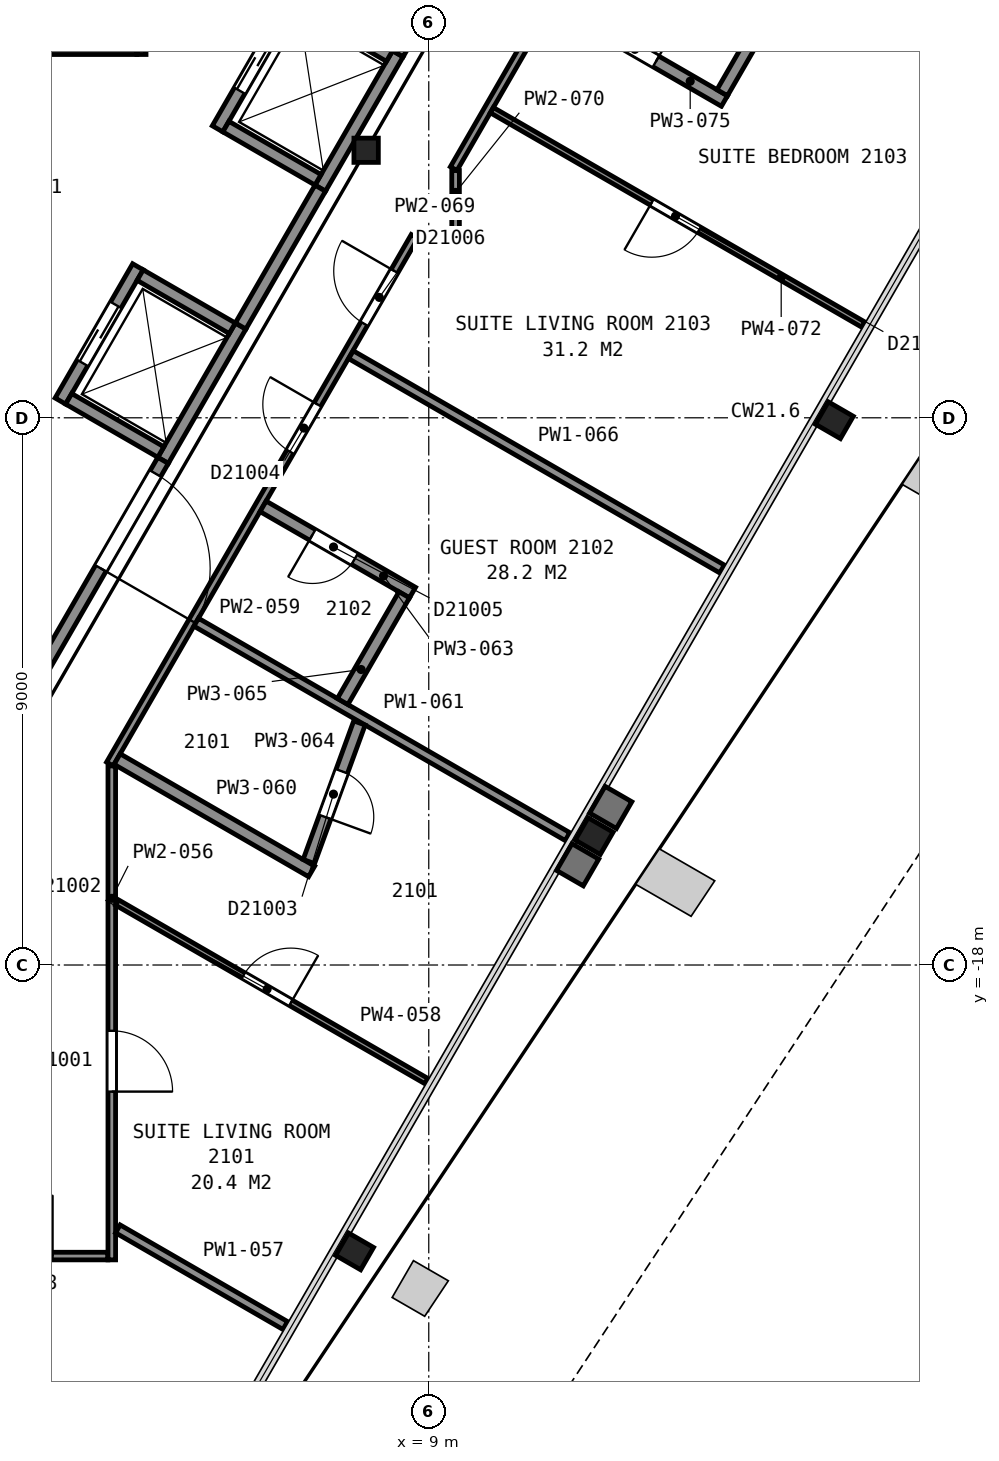
"""IFC4 building model, lengths in metres.
Left out: names, types, materials, properties, quantities, classifications, styles, units other than length and angle.
Written with IfcOpenShell. Run it as: python <this file> out.ifc"""

import sys

from ifc_helpers import new_model, si_unit, direction, frame, frame_2d, origin, origin_2d, place, context, subcontext, project, spatial, rectangle, i_section, extrude, element, fill, save


model = new_model("IFC4")
c1 = context("Model", 3, precision=1e-05, world=origin(), true_north=direction((0.0, 1.0)))
c2 = subcontext(c1, "Body", "Model", "MODEL_VIEW")
j1 = project(units=[si_unit("LENGTHUNIT", "METRE"), si_unit("PLANEANGLEUNIT", "RADIAN")], contexts=[c1])
p1 = place(None, origin())
s1 = spatial("IfcSite", under=j1, at=p1, CompositionType="ELEMENT")
p2 = place(p1, origin())
s2 = spatial("IfcBuilding", under=s1, at=p2, CompositionType="ELEMENT")
p3 = place(p2, frame((0.0, 0.0, 92.8)))
s3 = spatial("IfcBuildingStorey", under=s2, at=p3, CompositionType="ELEMENT", Elevation=92.8)
for number, where, z_axis, x_axis in (
    (1, (7.78, -22.71, 0.0), (0.0, 0.0, 1.0), (-0.5, -0.866, 0.0)),
    (2, (11.72, -15.88, 0.0), (0.0, 0.0, 1.0), (-0.5, -0.866, 0.0)),
    (3, (15.67, -9.04, 0.0), (0.0, 0.0, 1.0), (-0.5, -0.866, 0.0)),
):
    element("IfcColumn", number, at=place(p3, frame(where, z_axis=z_axis, x_axis=x_axis)), inside=s3, PredefinedType="COLUMN", context=c2, shape_type="SweptSolid", body=[
        extrude(i_section(OverallWidth=0.424, OverallDepth=0.475, WebThickness=0.048, FlangeThickness=0.077, FilletRadius=0.015, at=origin_2d()), origin(), (0.0, 0.0, 1.0), 3.6),
    ])
p4 = place(p3, frame((7.97, -4.6, 0.0), z_axis=(0.0, 0.0, 1.0), x_axis=(1.0, 0.0, 0.0)))
e4 = element("IfcColumn", 4, at=p4, inside=s3, PredefinedType="COLUMN", context=c2, shape_type="SweptSolid", body=[
    extrude(i_section(OverallWidth=0.401, OverallDepth=0.399, WebThickness=0.025, FlangeThickness=0.04, FilletRadius=0.015, at=origin_2d()), origin(), (0.0, 0.0, 1.0), 3.6),
])
p5 = place(p3, frame((4.63, -9.7, 0.0), z_axis=(0.0, 0.0, 1.0), x_axis=(0.500062241894, 0.865989465428, 0.0)))
e5 = element("IfcWall", 5, at=p5, inside=s3, PredefinedType="PARTITIONING", context=c2, shape_type="SweptSolid", body=[
    extrude(rectangle(XDim=2.55, YDim=0.2, at=frame_2d((1.275, 0.0))), origin(), (0.0, 0.0, 1.0), 3.6),
])
p6 = place(p3, frame((7.216, -5.222, 0.0), z_axis=(0.0, 0.0, 1.0), x_axis=(0.499990435942, 0.866030925526, 0.0)))
e6 = element("IfcWall", 6, at=p6, inside=s3, PredefinedType="PARTITIONING", context=c2, shape_type="SweptSolid", body=[
    extrude(rectangle(XDim=2.55, YDim=0.2, at=frame_2d((1.275, 0.0))), origin(), (0.0, 0.0, 1.0), 3.6),
])
p7 = place(p3, frame((2.942, -8.725, 0.0), z_axis=(0.0, 0.0, 1.0), x_axis=(0.500020783669, 0.866013403995, 0.0)))
e7 = element("IfcWall", 7, at=p7, inside=s3, PredefinedType="PARTITIONING", context=c2, shape_type="SweptSolid", body=[
    extrude(rectangle(XDim=2.55, YDim=0.2, at=frame_2d((1.275, 0.0))), origin(), (0.0, 0.0, 1.0), 3.6),
])
p8 = place(p7, frame((0.725, 0.0, 0.0)))
e8 = element("IfcOpeningElement", 8, at=p8, cuts=e7, PredefinedType="OPENING", context=c2, shape_type="SweptSolid", body=[
    extrude(rectangle(XDim=1.1, YDim=2.1, at=frame_2d((0.55, 1.05))), frame((0.0, 0.11, 0.0), z_axis=(0.0, -1.0, 0.0), x_axis=(1.0, 0.0, 0.0)), (0.0, 0.0, 1.0), 0.22),
])
p9 = place(p3, frame((5.527, -4.247, 0.0), z_axis=(0.0, 0.0, 1.0), x_axis=(0.499938297808, 0.866061024631, 0.0)))
e9 = element("IfcWall", 9, at=p9, inside=s3, PredefinedType="PARTITIONING", context=c2, shape_type="SweptSolid", body=[
    extrude(rectangle(XDim=2.35, YDim=0.2, at=frame_2d((1.175, 0.0))), origin(), (0.0, 0.0, 1.0), 3.6),
])
p10 = place(p9, frame((0.725, 0.0, 0.0)))
e10 = element("IfcOpeningElement", 10, at=p10, cuts=e9, PredefinedType="OPENING", context=c2, shape_type="SweptSolid", body=[
    extrude(rectangle(XDim=1.1, YDim=2.1, at=frame_2d((0.55, 1.05))), frame((0.0, 0.11, 0.0), z_axis=(0.0, -1.0, 0.0), x_axis=(1.0, 0.0, 0.0)), (0.0, 0.0, 1.0), 0.22),
])
p11 = place(p3, frame((8.354, -3.051, 0.0), z_axis=(0.0, 0.0, 1.0), x_axis=(-0.866060182126, 0.499939757307, 0.0)))
e11 = element("IfcWall", 11, at=p11, inside=s3, PredefinedType="PARTITIONING", context=c2, shape_type="SweptSolid", body=[
    extrude(rectangle(XDim=2.95, YDim=0.2, at=frame_2d((1.475, 0.0))), origin(), (0.0, 0.0, 1.0), 3.6),
])
p12 = place(p3, frame((7.179, -5.086, 0.0), z_axis=(0.0, 0.0, 1.0), x_axis=(-0.866036909293, 0.499980071345, 0.0)))
e12 = element("IfcWall", 12, at=p12, inside=s3, PredefinedType="PARTITIONING", context=c2, shape_type="SweptSolid", body=[
    extrude(rectangle(XDim=1.75, YDim=0.2, at=frame_2d((0.875, 0.0))), origin(), (0.0, 0.0, 1.0), 3.6),
])
p13 = place(p3, frame((5.769, -7.528, 0.0), z_axis=(0.0, 0.0, 1.0), x_axis=(-0.866002029911, 0.500040482552, 0.0)))
e13 = element("IfcWall", 13, at=p13, inside=s3, PredefinedType="PARTITIONING", context=c2, shape_type="SweptSolid", body=[
    extrude(rectangle(XDim=1.75, YDim=0.2, at=frame_2d((0.875, 0.0))), origin(), (0.0, 0.0, 1.0), 3.6),
])
p14 = place(p3, frame((4.594, -9.563, 0.0), z_axis=(0.0, 0.0, 1.0), x_axis=(-0.866036909293, 0.499980071345, 0.0)))
e14 = element("IfcWall", 14, at=p14, inside=s3, PredefinedType="PARTITIONING", context=c2, shape_type="SweptSolid", body=[
    extrude(rectangle(XDim=1.75, YDim=0.2, at=frame_2d((0.875, 0.0))), origin(), (0.0, 0.0, 1.0), 3.6),
])
p15 = place(p3, frame((1.677, -14.815, 0.0), z_axis=(0.0, 0.0, 1.0), x_axis=(0.49999445743, 0.866028603765, 0.0)))
e15 = element("IfcWall", 15, at=p15, inside=s3, PredefinedType="PARTITIONING", context=c2, shape_type="SweptSolid", body=[
    extrude(rectangle(XDim=5.905, YDim=0.2, at=frame_2d((2.952, 0.0))), origin(), (0.0, 0.0, 1.0), 3.35),
])
p16 = place(p15, frame((3.855, 0.0, 0.0)))
e16 = element("IfcOpeningElement", 16, at=p16, cuts=e15, PredefinedType="OPENING", context=c2, shape_type="SweptSolid", body=[
    extrude(rectangle(XDim=1.8, YDim=2.1, at=frame_2d((0.9, 1.05))), frame((0.0, 0.11, 0.0), z_axis=(0.0, -1.0, 0.0), x_axis=(1.0, 0.0, 0.0)), (0.0, 0.0, 1.0), 0.22),
])
p17 = place(p3, frame((1.8, -2.95, 0.0), z_axis=(0.0, 0.0, 1.0), x_axis=(1.0, 0.0, 0.0)))
e17 = element("IfcWall", 17, at=p17, inside=s3, PredefinedType="PARTITIONING", context=c2, shape_type="SweptSolid", body=[
    extrude(rectangle(XDim=2.4, YDim=0.15, at=frame_2d((1.2, 0.0))), origin(), (0.0, 0.0, 1.0), 3.35),
])
p18 = place(p3, frame((4.275, -3.025, 0.0), z_axis=(0.0, 0.0, 1.0), x_axis=(0.0, 1.0, 0.0)))
e18 = element("IfcWall", 18, at=p18, inside=s3, PredefinedType="PARTITIONING", context=c2, shape_type="SweptSolid", body=[
    extrude(rectangle(XDim=2.923, YDim=0.15, at=frame_2d((1.461, 0.0))), origin(), (0.0, 0.0, 1.0), 3.35),
])
p19 = place(p3, frame((5.906, -7.49, 0.0), z_axis=(0.0, 0.0, 1.0), x_axis=(0.500252727967, 0.865879442048, 0.0)))
e19 = element("IfcWall", 19, at=p19, inside=s3, PredefinedType="PARTITIONING", context=c2, shape_type="SweptSolid", body=[
    extrude(rectangle(XDim=2.617, YDim=0.2, at=frame_2d((1.309, 0.0))), origin(), (0.0, 0.0, 1.0), 3.35),
])
p20 = place(p3, frame((8.492, -3.012, 0.0), z_axis=(0.0, 0.0, 1.0), x_axis=(0.499972957231, 0.866041016371, 0.0)))
e20 = element("IfcWall", 20, at=p20, inside=s3, PredefinedType="PARTITIONING", context=c2, shape_type="SweptSolid", body=[
    extrude(rectangle(XDim=10.349, YDim=0.2, at=frame_2d((5.174, 0.0))), origin(), (0.0, 0.0, 1.0), 3.35),
])
p21 = place(p3, frame((3.722, -22.787, 0.0), z_axis=(0.0, 0.0, 1.0), x_axis=(-1.0, 0.0, 0.0)))
e21 = element("IfcWall", 21, at=p21, inside=s3, PredefinedType="PARTITIONING", context=c2, shape_type="SweptSolid", body=[
    extrude(rectangle(XDim=2.971, YDim=0.125, at=frame_2d((1.486, 0.0))), origin(), (0.0, 0.0, 1.0), 2.613),
])
p22 = place(p21, frame((0.909, 0.0, 0.0)))
e22 = element("IfcOpeningElement", 22, at=p22, cuts=e21, PredefinedType="OPENING", context=c2, shape_type="SweptSolid", body=[
    extrude(rectangle(XDim=1.0, YDim=2.1, at=frame_2d((0.5, 1.05))), frame((0.0, 0.073, 0.0), z_axis=(0.0, -1.0, 0.0), x_axis=(1.0, 0.0, 0.0)), (0.0, 0.0, 1.0), 0.145),
])
p23 = place(p3, frame((3.787, -14.725, 0.0), z_axis=(0.0, 0.0, 1.0), x_axis=(0.0, -1.0, 0.0)))
e23 = element("IfcWall", 23, at=p23, inside=s3, PredefinedType="PARTITIONING", context=c2, shape_type="SweptSolid", body=[
    extrude(rectangle(XDim=8.125, YDim=0.125, at=frame_2d((4.062, 0.0))), origin(), (0.0, 0.0, 1.0), 2.613),
])
p24 = place(p23, frame((4.357, 0.0, 0.0)))
e24 = element("IfcOpeningElement", 24, at=p24, cuts=e23, PredefinedType="OPENING", context=c2, shape_type="SweptSolid", body=[
    extrude(rectangle(XDim=1.0, YDim=2.1, at=frame_2d((0.5, 1.05))), frame((0.0, 0.073, 0.0), z_axis=(0.0, -1.0, 0.0), x_axis=(1.0, 0.0, 0.0)), (0.0, 0.0, 1.0), 0.145),
])
p25 = place(p3, frame((3.887, -22.34, 0.0), z_axis=(0.0, 0.0, 1.0), x_axis=(0.866065365018, -0.499930778725, 0.0)))
e25 = element("IfcWall", 25, at=p25, inside=s3, PredefinedType="PARTITIONING", context=c2, shape_type="SweptSolid", body=[
    extrude(rectangle(XDim=3.179, YDim=0.15, at=frame_2d((1.589, 0.0))), origin(), (0.0, 0.0, 1.0), 2.613),
])
p26 = place(p3, frame((3.875, -16.972, 0.0), z_axis=(0.0, 0.0, 1.0), x_axis=(0.86602429061, -0.500001928069, 0.0)))
e26 = element("IfcWall", 26, at=p26, inside=s3, PredefinedType="PARTITIONING", context=c2, shape_type="SweptSolid", body=[
    extrude(rectangle(XDim=5.873, YDim=0.1, at=frame_2d((2.937, 0.0))), origin(), (0.0, 0.0, 1.0), 2.613),
])
p27 = place(p26, frame((2.399, 0.0, 0.0)))
e27 = element("IfcOpeningElement", 27, at=p27, cuts=e26, PredefinedType="OPENING", context=c2, shape_type="SweptSolid", body=[
    extrude(rectangle(XDim=0.9, YDim=2.1, at=frame_2d((0.45, 1.05))), frame((0.0, 0.06, 0.0), z_axis=(0.0, -1.0, 0.0), x_axis=(1.0, 0.0, 0.0)), (0.0, 0.0, 1.0), 0.12),
])
p28 = place(p3, frame((8.766, -6.017, 0.0), z_axis=(0.0, 0.0, 1.0), x_axis=(-0.500051472265, -0.865995684219, 0.0)))
e28 = element("IfcWall", 28, at=p28, inside=s3, PredefinedType="PARTITIONING", context=c2, shape_type="SweptSolid", body=[
    extrude(rectangle(XDim=10.02, YDim=0.125, at=frame_2d((5.01, 0.0))), origin(), (0.0, 0.0, 1.0), 2.613),
])
p29 = place(p28, frame((3.19, 0.0, 0.0)))
e29 = element("IfcOpeningElement", 29, at=p29, cuts=e28, PredefinedType="OPENING", context=c2, shape_type="SweptSolid", body=[
    extrude(rectangle(XDim=0.9, YDim=2.1, at=frame_2d((0.45, 1.05))), frame((0.0, 0.073, 0.0), z_axis=(0.0, -1.0, 0.0), x_axis=(1.0, 0.0, 0.0)), (0.0, 0.0, 1.0), 0.145),
])
p30 = place(p28, frame((0.658, 0.0, 0.0)))
e30 = element("IfcOpeningElement", 30, at=p30, cuts=e28, PredefinedType="OPENING", context=c2, shape_type="SweptSolid", body=[
    extrude(rectangle(XDim=1.0, YDim=2.1, at=frame_2d((0.5, 1.05))), frame((0.0, 0.073, 0.0), z_axis=(0.0, -1.0, 0.0), x_axis=(1.0, 0.0, 0.0)), (0.0, 0.0, 1.0), 0.145),
])
p31 = place(p3, frame((3.875, -14.613, 0.0), z_axis=(0.0, 0.0, 1.0), x_axis=(0.865890522866, -0.500233547866, 0.0)))
e31 = element("IfcWall", 31, at=p31, inside=s3, PredefinedType="PARTITIONING", context=c2, shape_type="SweptSolid", body=[
    extrude(rectangle(XDim=3.694, YDim=0.2, at=frame_2d((1.847, 0.0))), origin(), (0.0, 0.0, 1.0), 2.613),
])
p32 = place(p3, frame((5.175, -12.362, 0.0), z_axis=(0.0, 0.0, 1.0), x_axis=(0.866031654768, -0.499989172823, 0.0)))
e32 = element("IfcWall", 32, at=p32, inside=s3, PredefinedType="PARTITIONING", context=c2, shape_type="SweptSolid", body=[
    extrude(rectangle(XDim=7.052, YDim=0.15, at=frame_2d((3.526, 0.0))), origin(), (0.0, 0.0, 1.0), 2.613),
])
p33 = place(p3, frame((8.733, -11.875, 0.0), z_axis=(0.0, 0.0, 1.0), x_axis=(-0.866048046904, 0.499960778915, 0.0)))
e33 = element("IfcWall", 33, at=p33, inside=s3, PredefinedType="PARTITIONING", context=c2, shape_type="SweptSolid", body=[
    extrude(rectangle(XDim=2.838, YDim=0.2, at=frame_2d((1.419, 0.0))), origin(), (0.0, 0.0, 1.0), 2.613),
])
p34 = place(p33, frame((1.1, 0.0, 0.0)))
e34 = element("IfcOpeningElement", 34, at=p34, cuts=e33, PredefinedType="OPENING", context=c2, shape_type="SweptSolid", body=[
    extrude(rectangle(XDim=0.8, YDim=2.1, at=frame_2d((0.4, 1.05))), frame((0.0, 0.11, 0.0), z_axis=(0.0, -1.0, 0.0), x_axis=(1.0, 0.0, 0.0)), (0.0, 0.0, 1.0), 0.22),
])
p35 = place(p3, frame((7.028, -16.298, 0.0), z_axis=(0.0, 0.0, 1.0), x_axis=(0.342817359533, 0.939402074728, 0.0)))
e35 = element("IfcWall", 35, at=p35, inside=s3, PredefinedType="PARTITIONING", context=c2, shape_type="SweptSolid", body=[
    extrude(rectangle(XDim=2.426, YDim=0.2, at=frame_2d((1.213, 0.0))), origin(), (0.0, 0.0, 1.0), 2.613),
])
p36 = place(p35, frame((0.78, 0.0, 0.0)))
e36 = element("IfcOpeningElement", 36, at=p36, cuts=e35, PredefinedType="OPENING", context=c2, shape_type="SweptSolid", body=[
    extrude(rectangle(XDim=0.8, YDim=2.1, at=frame_2d((0.4, 1.05))), frame((0.0, 0.11, 0.0), z_axis=(0.0, -1.0, 0.0), x_axis=(1.0, 0.0, 0.0)), (0.0, 0.0, 1.0), 0.22),
])
p37 = place(p3, frame((7.583, -13.666, 0.0), z_axis=(0.0, 0.0, 1.0), x_axis=(0.49983374806, 0.866121368112, 0.0)))
e37 = element("IfcWall", 37, at=p37, inside=s3, PredefinedType="PARTITIONING", context=c2, shape_type="SweptSolid", body=[
    extrude(rectangle(XDim=2.026, YDim=0.2, at=frame_2d((1.013, 0.0))), origin(), (0.0, 0.0, 1.0), 2.613),
])
p38 = place(p3, frame((7.72, -7.963, 0.0), z_axis=(0.0, 0.0, 1.0), x_axis=(0.865980767462, -0.500077304409, 0.0)))
e38 = element("IfcWall", 38, at=p38, inside=s3, PredefinedType="PARTITIONING", context=c2, shape_type="SweptSolid", body=[
    extrude(rectangle(XDim=7.047, YDim=0.15, at=frame_2d((3.524, 0.0))), origin(), (0.0, 0.0, 1.0), 2.613),
])
p39 = place(p3, frame((8.82, -6.071, 0.0), z_axis=(0.0, 0.0, 1.0), x_axis=(1.0, 0.0, 0.0)))
e39 = element("IfcWall", 39, at=p39, inside=s3, PredefinedType="PARTITIONING", context=c2, shape_type="SweptSolid", body=[
    extrude(rectangle(XDim=0.556, YDim=0.125, at=frame_2d((0.278, 0.0))), origin(), (0.0, 0.0, 1.0), 2.613),
])
p40 = place(p3, frame((9.441, -6.134, 0.0), z_axis=(0.0, 0.0, 1.0), x_axis=(0.0, 1.0, 0.0)))
e40 = element("IfcWall", 40, at=p40, inside=s3, PredefinedType="PARTITIONING", context=c2, shape_type="SweptSolid", body=[
    extrude(rectangle(XDim=1.2, YDim=0.125, at=frame_2d((0.6, 0.0))), origin(), (0.0, 0.0, 1.0), 2.613),
])
p41 = place(p3, frame((9.41, -4.902, 0.0), z_axis=(0.0, 0.0, 1.0), x_axis=(0.499971244726, 0.866042005013, 0.0)))
e41 = element("IfcWall", 41, at=p41, inside=s3, PredefinedType="PARTITIONING", context=c2, shape_type="SweptSolid", body=[
    extrude(rectangle(XDim=10.052, YDim=0.125, at=frame_2d((5.026, 0.0))), origin(), (0.0, 0.0, 1.0), 2.613),
])
p42 = place(p3, frame((10.037, -3.94, 0.0), z_axis=(0.0, 0.0, 1.0), x_axis=(0.866063951978, -0.499933226626, 0.0)))
e42 = element("IfcWall", 42, at=p42, inside=s3, PredefinedType="PARTITIONING", context=c2, shape_type="SweptSolid", body=[
    extrude(rectangle(XDim=7.052, YDim=0.1, at=frame_2d((3.526, 0.0))), origin(), (0.0, 0.0, 1.0), 2.613),
])
p43 = place(p42, frame((3.038, 0.0, 0.0)))
e43 = element("IfcOpeningElement", 43, at=p43, cuts=e42, PredefinedType="OPENING", context=c2, shape_type="SweptSolid", body=[
    extrude(rectangle(XDim=0.9, YDim=2.1, at=frame_2d((0.45, 1.05))), frame((0.0, 0.06, 0.0), z_axis=(0.0, -1.0, 0.0), x_axis=(1.0, 0.0, 0.0)), (0.0, 0.0, 1.0), 0.12),
])
p44 = place(p3, frame((11.062, -2.174, 0.0), z_axis=(0.0, 0.0, 1.0), x_axis=(0.866078705744, -0.499907666931, 0.0)))
e44 = element("IfcWall", 44, at=p44, inside=s3, PredefinedType="PARTITIONING", context=c2, shape_type="SweptSolid", body=[
    extrude(rectangle(XDim=3.233, YDim=0.2, at=frame_2d((1.616, 0.0))), origin(), (0.0, 0.0, 1.0), 2.613),
])
p45 = place(p44, frame((1.133, 0.0, 0.0)))
e45 = element("IfcOpeningElement", 45, at=p45, cuts=e44, PredefinedType="OPENING", context=c2, shape_type="SweptSolid", body=[
    extrude(rectangle(XDim=0.8, YDim=2.1, at=frame_2d((0.4, 1.05))), frame((0.0, 0.11, 0.0), z_axis=(0.0, -1.0, 0.0), x_axis=(1.0, 0.0, 0.0)), (0.0, 0.0, 1.0), 0.22),
])
p46 = place(p3, frame((12.363, 0.078, 0.0), z_axis=(0.0, 0.0, 1.0), x_axis=(0.86605175433, -0.499954356739, 0.0)))
e46 = element("IfcWall", 46, at=p46, inside=s3, PredefinedType="PARTITIONING", context=c2, shape_type="SweptSolid", body=[
    extrude(rectangle(XDim=7.048, YDim=0.15, at=frame_2d((3.524, 0.0))), origin(), (0.0, 0.0, 1.0), 2.613),
])
p47 = place(p3, frame((13.826, -3.653, 0.0), z_axis=(0.0, 0.0, 1.0), x_axis=(0.499719542643, 0.866187265377, 0.0)))
e47 = element("IfcWall", 47, at=p47, inside=s3, PredefinedType="PARTITIONING", context=c2, shape_type="SweptSolid", body=[
    extrude(rectangle(XDim=2.42, YDim=0.2, at=frame_2d((1.21, 0.0))), origin(), (0.0, 0.0, 1.0), 2.613),
])
p48 = place(p8, origin())
e48 = element("IfcDoor", 48, at=p48, inside=s3, OperationType="SLIDING_TO_RIGHT", PredefinedType="DOOR", context=c2, shape_type="SweptSolid", body=[
    extrude(rectangle(XDim=1.1, YDim=2.1, at=frame_2d((0.55, 1.05))), frame((0.0, 0.025, 0.0), z_axis=(0.0, -1.0, 0.0), x_axis=(1.0, 0.0, 0.0)), (0.0, 0.0, 1.0), 0.05),
])
fill(e8, e48)
p49 = place(p10, origin())
e49 = element("IfcDoor", 49, at=p49, inside=s3, OperationType="SLIDING_TO_LEFT", PredefinedType="DOOR", context=c2, shape_type="SweptSolid", body=[
    extrude(rectangle(XDim=1.1, YDim=2.1, at=frame_2d((0.55, 1.05))), frame((0.0, 0.025, 0.0), z_axis=(0.0, -1.0, 0.0), x_axis=(1.0, 0.0, 0.0)), (0.0, 0.0, 1.0), 0.05),
])
fill(e10, e49)
p50 = place(p16, origin())
e50 = element("IfcDoor", 50, at=p50, inside=s3, OperationType="DOUBLE_DOOR_SINGLE_SWING", PredefinedType="DOOR", context=c2, shape_type="SweptSolid", body=[
    extrude(rectangle(XDim=1.8, YDim=2.1, at=frame_2d((0.9, 1.05))), frame((0.0, 0.025, 0.0), z_axis=(0.0, -1.0, 0.0), x_axis=(1.0, 0.0, 0.0)), (0.0, 0.0, 1.0), 0.05),
])
fill(e16, e50)
p51 = place(p22, origin())
e51 = element("IfcDoor", 51, at=p51, inside=s3, OperationType="SINGLE_SWING_LEFT", PredefinedType="DOOR", context=c2, shape_type="SweptSolid", body=[
    extrude(rectangle(XDim=1.0, YDim=2.1, at=frame_2d((0.5, 1.05))), frame((0.0, 0.025, 0.0), z_axis=(0.0, -1.0, 0.0), x_axis=(1.0, 0.0, 0.0)), (0.0, 0.0, 1.0), 0.05),
])
fill(e22, e51)
p52 = place(p24, origin())
e52 = element("IfcDoor", 52, at=p52, inside=s3, OperationType="SINGLE_SWING_RIGHT", PredefinedType="DOOR", context=c2, shape_type="SweptSolid", body=[
    extrude(rectangle(XDim=1.0, YDim=2.1, at=frame_2d((0.5, 1.05))), frame((0.0, 0.025, 0.0), z_axis=(0.0, -1.0, 0.0), x_axis=(1.0, 0.0, 0.0)), (0.0, 0.0, 1.0), 0.05),
])
fill(e24, e52)
p53 = place(p27, origin())
e53 = element("IfcDoor", 53, at=p53, inside=s3, OperationType="SINGLE_SWING_RIGHT", PredefinedType="DOOR", context=c2, shape_type="SweptSolid", body=[
    extrude(rectangle(XDim=0.9, YDim=2.1, at=frame_2d((0.45, 1.05))), frame((0.0, 0.025, 0.0), z_axis=(0.0, -1.0, 0.0), x_axis=(1.0, 0.0, 0.0)), (0.0, 0.0, 1.0), 0.05),
])
fill(e27, e53)
p54 = place(p29, origin())
e54 = element("IfcDoor", 54, at=p54, inside=s3, OperationType="SINGLE_SWING_LEFT", PredefinedType="DOOR", context=c2, shape_type="SweptSolid", body=[
    extrude(rectangle(XDim=0.9, YDim=2.1, at=frame_2d((0.45, 1.05))), frame((0.0, 0.025, 0.0), z_axis=(0.0, -1.0, 0.0), x_axis=(1.0, 0.0, 0.0)), (0.0, 0.0, 1.0), 0.05),
])
fill(e29, e54)
p55 = place(p30, origin())
e55 = element("IfcDoor", 55, at=p55, inside=s3, OperationType="SINGLE_SWING_LEFT", PredefinedType="DOOR", context=c2, shape_type="SweptSolid", body=[
    extrude(rectangle(XDim=1.0, YDim=2.1, at=frame_2d((0.5, 1.05))), frame((0.0, 0.025, 0.0), z_axis=(0.0, -1.0, 0.0), x_axis=(1.0, 0.0, 0.0)), (0.0, 0.0, 1.0), 0.05),
])
fill(e30, e55)
p56 = place(p34, origin())
e56 = element("IfcDoor", 56, at=p56, inside=s3, OperationType="SINGLE_SWING_RIGHT", PredefinedType="DOOR", context=c2, shape_type="SweptSolid", body=[
    extrude(rectangle(XDim=0.8, YDim=2.1, at=frame_2d((0.4, 1.05))), frame((0.0, 0.025, 0.0), z_axis=(0.0, -1.0, 0.0), x_axis=(1.0, 0.0, 0.0)), (0.0, 0.0, 1.0), 0.05),
])
fill(e34, e56)
p57 = place(p36, origin())
e57 = element("IfcDoor", 57, at=p57, inside=s3, OperationType="SINGLE_SWING_LEFT", PredefinedType="DOOR", context=c2, shape_type="SweptSolid", body=[
    extrude(rectangle(XDim=0.8, YDim=2.1, at=frame_2d((0.4, 1.05))), frame((0.0, 0.025, 0.0), z_axis=(0.0, -1.0, 0.0), x_axis=(1.0, 0.0, 0.0)), (0.0, 0.0, 1.0), 0.05),
])
fill(e36, e57)
p58 = place(p43, origin())
e58 = element("IfcDoor", 58, at=p58, inside=s3, OperationType="SINGLE_SWING_LEFT", PredefinedType="DOOR", context=c2, shape_type="SweptSolid", body=[
    extrude(rectangle(XDim=0.9, YDim=2.1, at=frame_2d((0.45, 1.05))), frame((0.0, 0.025, 0.0), z_axis=(0.0, -1.0, 0.0), x_axis=(1.0, 0.0, 0.0)), (0.0, 0.0, 1.0), 0.05),
])
fill(e43, e58)
p59 = place(p45, origin())
e59 = element("IfcDoor", 59, at=p59, inside=s3, OperationType="SINGLE_SWING_RIGHT", PredefinedType="DOOR", context=c2, shape_type="SweptSolid", body=[
    extrude(rectangle(XDim=0.8, YDim=2.1, at=frame_2d((0.4, 1.05))), frame((0.0, 0.025, 0.0), z_axis=(0.0, -1.0, 0.0), x_axis=(1.0, 0.0, 0.0)), (0.0, 0.0, 1.0), 0.05),
])
fill(e45, e59)
save(model, sys.argv[1])
